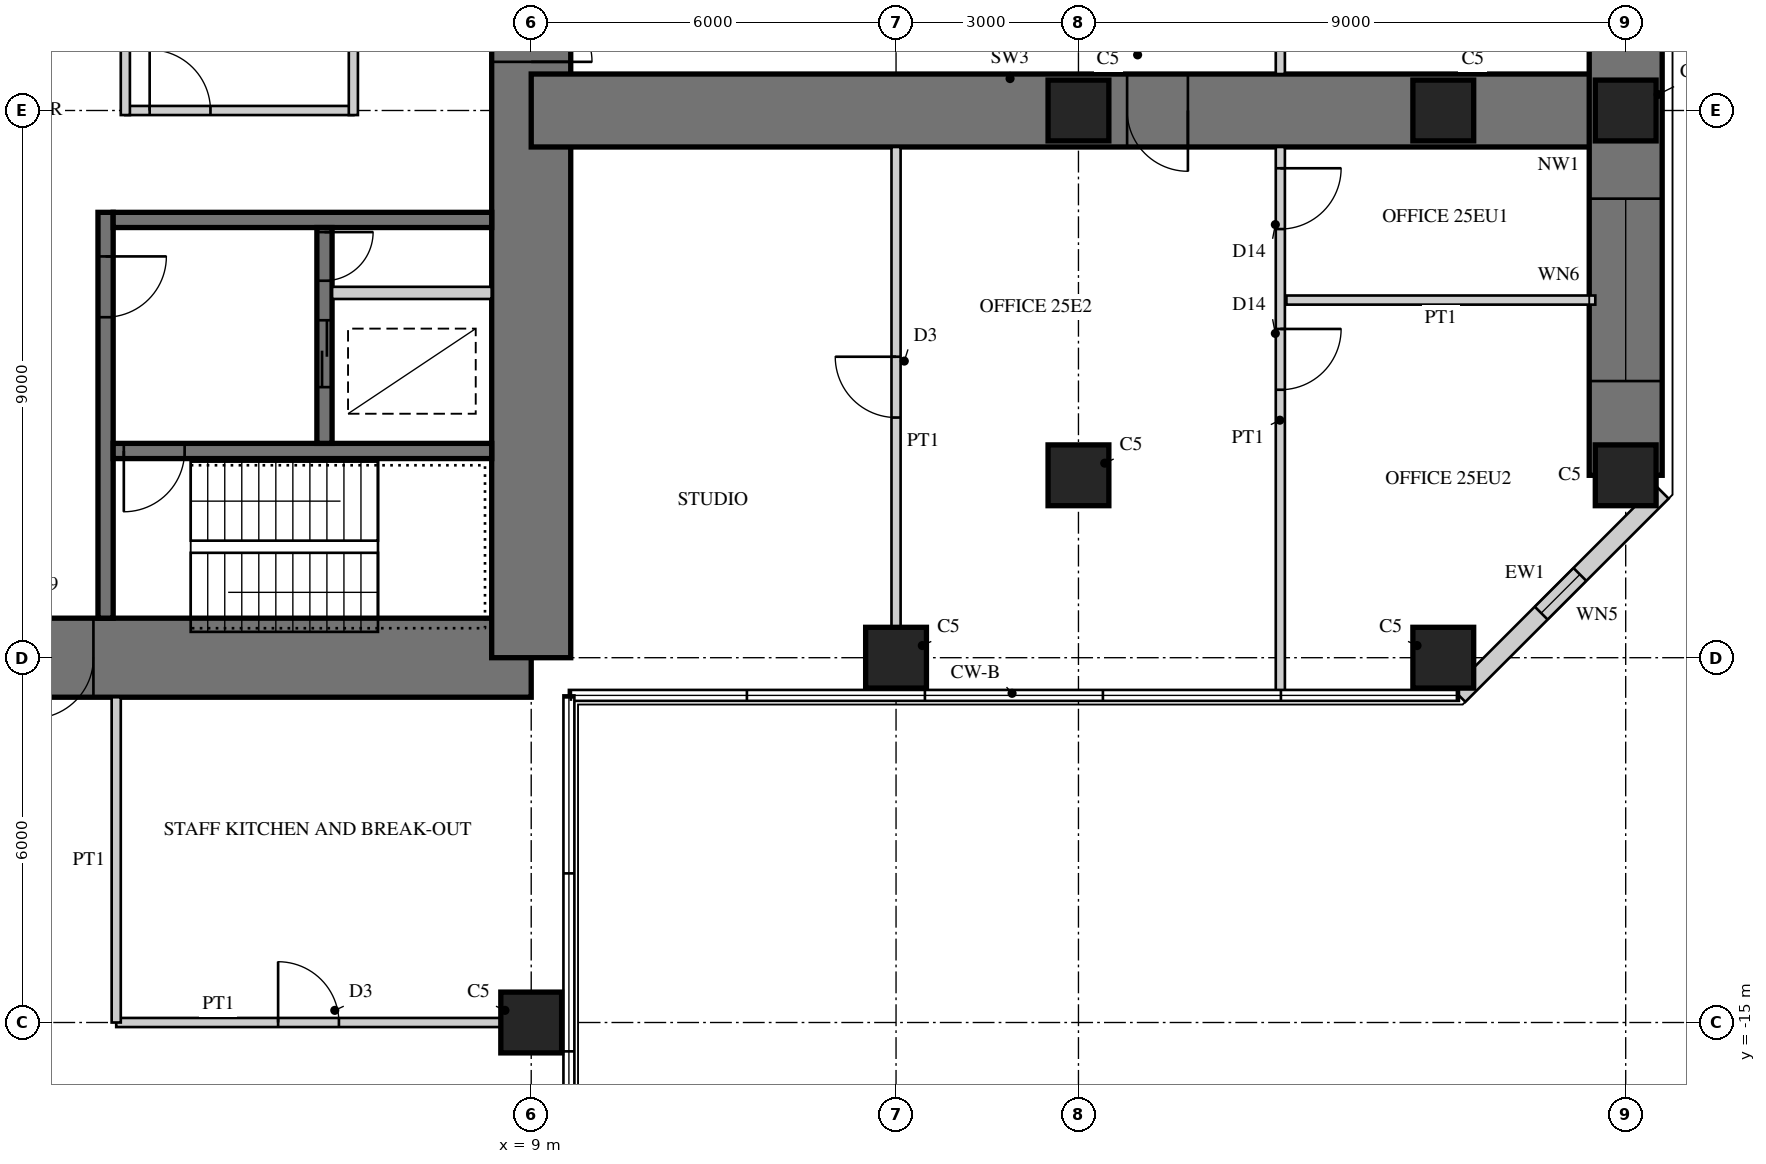
"""IFC4 building model, lengths in metres.
Left out: names, types, materials, properties, quantities, classifications, styles, units other than length and angle.
Written with IfcOpenShell. Run it as: python <this file> out.ifc"""

import sys

from ifc_helpers import new_model, si_unit, direction, frame, frame_2d, origin, origin_2d, place, context, subcontext, project, spatial, rectangle, hollow_rectangle, extrude, element, fill, save


model = new_model("IFC4")
c1 = context("Model", 3, precision=1e-05, world=origin(), true_north=direction((0.0, 1.0)))
c2 = subcontext(c1, "Body", "Model", "MODEL_VIEW")
j1 = project(units=[si_unit("LENGTHUNIT", "METRE"), si_unit("PLANEANGLEUNIT", "RADIAN")], contexts=[c1])
p1 = place(None, origin())
s1 = spatial("IfcSite", under=j1, at=p1, CompositionType="ELEMENT")
p2 = place(p1, origin())
s2 = spatial("IfcBuilding", under=s1, at=p2, CompositionType="ELEMENT")
p3 = place(p2, frame((0.0, 0.0, 104.5)))
s3 = spatial("IfcBuildingStorey", under=s2, at=p3, CompositionType="ELEMENT", Elevation=104.5)
p4 = place(p3, frame((-9.0, -9.0, 0.0), z_axis=(0.0, 0.0, 1.0), x_axis=(1.0, 0.0, 0.0)))
e1 = element("IfcWall", 1, at=p4, inside=s3, PredefinedType="SHEAR", context=c2, shape_type="SweptSolid", body=[
    extrude(rectangle(XDim=18.0, YDim=1.3, at=frame_2d((9.0, 0.0))), origin(), (0.0, 0.0, 1.0), 4.0),
])
p5 = place(p4, frame((9.8, 0.0, 0.0)))
e2 = element("IfcOpeningElement", 2, at=p5, cuts=e1, PredefinedType="OPENING", context=c2, shape_type="SweptSolid", body=[
    extrude(rectangle(XDim=1.0, YDim=2.4, at=frame_2d((0.5, 1.2))), frame((0.0, 0.66, 0.0), z_axis=(0.0, -1.0, 0.0), x_axis=(1.0, 0.0, 0.0)), (0.0, 0.0, 1.0), 1.32),
])
p6 = place(p3, frame((9.0, -9.0, 0.0), z_axis=(0.0, 0.0, 1.0), x_axis=(0.0, 1.0, 0.0)))
e3 = element("IfcWall", 3, at=p6, inside=s3, PredefinedType="SHEAR", context=c2, shape_type="SweptSolid", body=[
    extrude(rectangle(XDim=18.0, YDim=1.3, at=frame_2d((9.0, 0.0))), origin(), (0.0, 0.0, 1.0), 4.0),
])
p7 = place(p6, frame((9.8, 0.0, 0.0)))
e4 = element("IfcOpeningElement", 4, at=p7, cuts=e3, PredefinedType="OPENING", context=c2, shape_type="SweptSolid", body=[
    extrude(rectangle(XDim=1.0, YDim=2.4, at=frame_2d((0.5, 1.2))), frame((0.0, 0.66, 0.0), z_axis=(0.0, -1.0, 0.0), x_axis=(1.0, 0.0, 0.0)), (0.0, 0.0, 1.0), 1.32),
])
p8 = place(p3, frame((2.0, -1.675, 0.0), z_axis=(0.0, 0.0, 1.0), x_axis=(0.0, -1.0, 0.0)))
e5 = element("IfcWall", 5, at=p8, inside=s3, PredefinedType="SHEAR", context=c2, shape_type="SweptSolid", body=[
    extrude(rectangle(XDim=6.675, YDim=0.25, at=frame_2d((3.337, 0.0))), origin(), (0.0, 0.0, 1.0), 4.0),
])
p9 = place(p8, frame((0.725, 0.0, 0.0)))
e6 = element("IfcOpeningElement", 6, at=p9, cuts=e5, PredefinedType="OPENING", context=c2, shape_type="SweptSolid", body=[
    extrude(rectangle(XDim=1.0, YDim=2.1, at=frame_2d((0.5, 1.05))), frame((0.0, 0.135, 0.0), z_axis=(0.0, -1.0, 0.0), x_axis=(1.0, 0.0, 0.0)), (0.0, 0.0, 1.0), 0.27),
])
p10 = place(p3, frame((2.125, -1.8, 0.0), z_axis=(0.0, 0.0, 1.0), x_axis=(1.0, 0.0, 0.0)))
e7 = element("IfcWall", 7, at=p10, inside=s3, PredefinedType="SHEAR", context=c2, shape_type="SweptSolid", body=[
    extrude(rectangle(XDim=6.225, YDim=0.25, at=frame_2d((3.113, 0.0))), origin(), (0.0, 0.0, 1.0), 4.0),
])
p11 = place(p3, frame((2.125, -5.6, 0.0), z_axis=(0.0, 0.0, 1.0), x_axis=(1.0, 0.0, 0.0)))
e8 = element("IfcWall", 8, at=p11, inside=s3, PredefinedType="SHEAR", context=c2, shape_type="SweptSolid", body=[
    extrude(rectangle(XDim=6.225, YDim=0.25, at=frame_2d((3.113, 0.0))), origin(), (0.0, 0.0, 1.0), 4.0),
])
p12 = place(p11, frame((0.175, 0.0, 0.0)))
e9 = element("IfcOpeningElement", 9, at=p12, cuts=e8, PredefinedType="OPENING", context=c2, shape_type="SweptSolid", body=[
    extrude(rectangle(XDim=1.0, YDim=2.1, at=frame_2d((0.5, 1.05))), frame((0.0, 0.135, 0.0), z_axis=(0.0, -1.0, 0.0), x_axis=(1.0, 0.0, 0.0)), (0.0, 0.0, 1.0), 0.27),
])
p13 = place(p3, frame((5.6, -1.925, 0.0), z_axis=(0.0, 0.0, 1.0), x_axis=(0.0, -1.0, 0.0)))
e10 = element("IfcWall", 10, at=p13, inside=s3, PredefinedType="SHEAR", context=c2, shape_type="SweptSolid", body=[
    extrude(rectangle(XDim=3.55, YDim=0.25, at=frame_2d((1.775, 0.0))), origin(), (0.0, 0.0, 1.0), 4.0),
])
p14 = place(p13, frame((1.525, 0.0, 0.0)))
e11 = element("IfcOpeningElement", 11, at=p14, cuts=e10, PredefinedType="OPENING", context=c2, shape_type="SweptSolid", body=[
    extrude(rectangle(XDim=1.1, YDim=2.2, at=frame_2d((0.55, 1.1))), frame((0.0, 0.135, 0.0), z_axis=(0.0, -1.0, 0.0), x_axis=(1.0, 0.0, 0.0)), (0.0, 0.0, 1.0), 0.27),
])
p15 = place(p13, frame((0.075, 0.0, 0.0)))
e12 = element("IfcOpeningElement", 12, at=p15, cuts=e10, PredefinedType="OPENING", context=c2, shape_type="SweptSolid", body=[
    extrude(rectangle(XDim=0.8, YDim=2.1, at=frame_2d((0.4, 1.05))), frame((0.0, 0.135, 0.0), z_axis=(0.0, -1.0, 0.0), x_axis=(1.0, 0.0, 0.0)), (0.0, 0.0, 1.0), 0.27),
])
p16 = place(p3, frame((5.725, -3.0, 0.0), z_axis=(0.0, 0.0, 1.0), x_axis=(1.0, 0.0, 0.0)))
e13 = element("IfcWall", 13, at=p16, inside=s3, PredefinedType="PARTITIONING", context=c2, shape_type="SweptSolid", body=[
    extrude(rectangle(XDim=2.625, YDim=0.2, at=frame_2d((1.312, 0.0))), origin(), (0.0, 0.0, 1.0), 4.0),
])
p17 = place(p3, frame((9.0, 0.0, 0.0), z_axis=(0.0, 0.0, 1.0), x_axis=(1.0, 0.0, 0.0)))
e14 = element("IfcWall", 14, at=p17, inside=s3, PredefinedType="SHEAR", context=c2, shape_type="SweptSolid", body=[
    extrude(rectangle(XDim=18.0, YDim=1.2, at=frame_2d((9.0, 0.0))), origin(), (0.0, 0.0, 1.0), 4.0),
])
p18 = place(p17, frame((9.8, 0.0, 0.0)))
e15 = element("IfcOpeningElement", 15, at=p18, cuts=e14, PredefinedType="OPENING", context=c2, shape_type="SweptSolid", body=[
    extrude(rectangle(XDim=1.0, YDim=2.2, at=frame_2d((0.5, 1.1))), frame((0.0, 0.61, 0.0), z_axis=(0.0, -1.0, 0.0), x_axis=(1.0, 0.0, 0.0)), (0.0, 0.0, 1.0), 1.22),
])
p19 = place(p3, frame((27.0, -6.0, 0.0), z_axis=(0.0, 0.0, 1.0), x_axis=(0.0, 1.0, 0.0)))
e16 = element("IfcWall", 16, at=p19, inside=s3, PredefinedType="SHEAR", context=c2, shape_type="SweptSolid", body=[
    extrude(rectangle(XDim=12.0, YDim=1.2, at=frame_2d((6.0, 0.0))), origin(), (0.0, 0.0, 1.0), 4.0),
])
p20 = place(p19, frame((1.55, 0.0, 0.6)))
e17 = element("IfcOpeningElement", 17, at=p20, cuts=e16, PredefinedType="OPENING", context=c2, shape_type="SweptSolid", body=[
    extrude(rectangle(XDim=3.0, YDim=2.4, at=frame_2d((1.5, 1.2))), frame((0.0, 0.61, 0.0), z_axis=(0.0, -1.0, 0.0), x_axis=(1.0, 0.0, 0.0)), (0.0, 0.0, 1.0), 1.22),
])
p21 = place(p19, frame((7.45, 0.0, 0.6)))
e18 = element("IfcOpeningElement", 18, at=p21, cuts=e16, PredefinedType="OPENING", context=c2, shape_type="SweptSolid", body=[
    extrude(rectangle(XDim=3.0, YDim=2.4, at=frame_2d((1.5, 1.2))), frame((0.0, 0.61, 0.0), z_axis=(0.0, -1.0, 0.0), x_axis=(1.0, 0.0, 0.0)), (0.0, 0.0, 1.0), 1.22),
])
for number, where, z_axis, x_axis in (
    (19, (15.0, -9.0, 0.0), (0.0, 0.0, 1.0), (1.0, 0.0, 0.0)),
    (20, (24.0, -9.0, 0.0), (0.0, 0.0, 1.0), (1.0, 0.0, 0.0)),
    (21, (27.0, -6.0, 0.0), (0.0, 0.0, 1.0), (1.0, 0.0, 0.0)),
    (22, (27.0, 0.0, 0.0), (0.0, 0.0, 1.0), (1.0, 0.0, 0.0)),
    (23, (9.0, -15.0, 0.0), (0.0, 0.0, 1.0), (1.0, 0.0, 0.0)),
    (24, (18.0, -6.0, 0.0), (0.0, 0.0, 1.0), (1.0, 0.0, 0.0)),
    (25, (18.0, 0.0, 0.0), (0.0, 0.0, 1.0), (1.0, 0.0, 0.0)),
    (26, (24.0, 0.0, 0.0), (0.0, 0.0, 1.0), (1.0, 0.0, 0.0)),
):
    element("IfcColumn", number, at=place(p3, frame(where, z_axis=z_axis, x_axis=x_axis)), inside=s3, PredefinedType="COLUMN", context=c2, shape_type="SweptSolid", body=[
        extrude(rectangle(XDim=1.0, YDim=1.0, at=origin_2d()), origin(), (0.0, 0.0, 1.0), 4.0),
    ])
p22 = place(p3, frame((24.257, -9.62, 0.0), z_axis=(0.0, 0.0, 1.0), x_axis=(0.707106781187, 0.707106781187, 0.0)))
e27 = element("IfcWall", 27, at=p22, inside=s3, PredefinedType="SOLIDWALL", context=c2, shape_type="SweptSolid", body=[
    extrude(rectangle(XDim=4.728, YDim=0.3, at=frame_2d((2.364, 0.0))), origin(), (0.0, 0.0, 1.0), 3.8),
])
p23 = place(p22, frame((1.914, 0.0, 0.3)))
e28 = element("IfcOpeningElement", 28, at=p23, cuts=e27, PredefinedType="OPENING", context=c2, shape_type="SweptSolid", body=[
    extrude(rectangle(XDim=0.9, YDim=2.4, at=frame_2d((0.45, 1.2))), frame((0.0, 0.16, 0.0), z_axis=(0.0, -1.0, 0.0), x_axis=(1.0, 0.0, 0.0)), (0.0, 0.0, 1.0), 0.32),
])
p24 = place(p3, frame((2.325, 0.0, 0.0), z_axis=(0.0, 0.0, 1.0), x_axis=(1.0, 0.0, 0.0)))
e29 = element("IfcWall", 29, at=p24, inside=s3, PredefinedType="PARTITIONING", context=c2, shape_type="SweptSolid", body=[
    extrude(rectangle(XDim=3.75, YDim=0.15, at=frame_2d((1.875, 0.0))), origin(), (0.0, 0.0, 1.0), 3.8),
])
p25 = place(p24, frame((0.4, 0.0, 0.0)))
e30 = element("IfcOpeningElement", 30, at=p25, cuts=e29, PredefinedType="OPENING", context=c2, shape_type="SweptSolid", body=[
    extrude(rectangle(XDim=1.0, YDim=2.1, at=frame_2d((0.5, 1.05))), frame((0.0, 0.085, 0.0), z_axis=(0.0, -1.0, 0.0), x_axis=(1.0, 0.0, 0.0)), (0.0, 0.0, 1.0), 0.17),
])
for number, where, z_axis, x_axis in (
    (31, (2.325, 1.875, 0.0), (0.0, 0.0, 1.0), (0.0, -1.0, 0.0)),
    (32, (6.075, -0.075, 0.0), (0.0, 0.0, 1.0), (0.0, 1.0, 0.0)),
):
    element("IfcWall", number, at=place(p3, frame(where, z_axis=z_axis, x_axis=x_axis)), inside=s3, PredefinedType="PARTITIONING", context=c2, shape_type="SweptSolid", body=[
        extrude(rectangle(XDim=1.95, YDim=0.15, at=frame_2d((0.975, 0.0))), origin(), (0.0, 0.0, 1.0), 3.8),
    ])
p26 = place(p3, frame((15.0, -8.5, 0.0), z_axis=(0.0, 0.0, 1.0), x_axis=(0.0, 1.0, 0.0)))
e33 = element("IfcWall", 33, at=p26, inside=s3, PredefinedType="PARTITIONING", context=c2, shape_type="SweptSolid", body=[
    extrude(rectangle(XDim=7.9, YDim=0.15, at=frame_2d((3.95, 0.0))), origin(), (0.0, 0.0, 1.0), 3.0),
])
p27 = place(p26, frame((3.45, 0.0, 0.0)))
e34 = element("IfcOpeningElement", 34, at=p27, cuts=e33, PredefinedType="OPENING", context=c2, shape_type="SweptSolid", body=[
    extrude(rectangle(XDim=1.0, YDim=2.1, at=frame_2d((0.5, 1.05))), frame((0.0, 0.085, 0.0), z_axis=(0.0, -1.0, 0.0), x_axis=(1.0, 0.0, 0.0)), (0.0, 0.0, 1.0), 0.17),
])
p28 = place(p3, frame((21.32, 0.6, 0.0), z_axis=(0.0, 0.0, 1.0), x_axis=(0.0, 1.0, 0.0)))
e35 = element("IfcWall", 35, at=p28, inside=s3, PredefinedType="PARTITIONING", context=c2, shape_type="SweptSolid", body=[
    extrude(rectangle(XDim=8.98, YDim=0.15, at=frame_2d((4.49, 0.0))), origin(), (0.0, 0.0, 1.0), 3.8),
])
p29 = place(p28, frame((0.45, 0.0, 0.0)))
e36 = element("IfcOpeningElement", 36, at=p29, cuts=e35, PredefinedType="OPENING", context=c2, shape_type="SweptSolid", body=[
    extrude(rectangle(XDim=1.0, YDim=2.2, at=frame_2d((0.5, 1.1))), frame((0.0, 0.085, 0.0), z_axis=(0.0, -1.0, 0.0), x_axis=(1.0, 0.0, 0.0)), (0.0, 0.0, 1.0), 0.17),
])
p30 = place(p3, frame((21.42, -3.118, 0.0), z_axis=(0.0, 0.0, 1.0), x_axis=(1.0, 0.0, 0.0)))
e37 = element("IfcWall", 37, at=p30, inside=s3, PredefinedType="PARTITIONING", context=c2, shape_type="SweptSolid", body=[
    extrude(rectangle(XDim=5.08, YDim=0.15, at=frame_2d((2.54, 0.0))), origin(), (0.0, 0.0, 1.0), 3.8),
])
p31 = place(p3, frame((21.32, -9.58, 0.0), z_axis=(0.0, 0.0, 1.0), x_axis=(0.0, 1.0, 0.0)))
e38 = element("IfcWall", 38, at=p31, inside=s3, PredefinedType="PARTITIONING", context=c2, shape_type="SweptSolid", body=[
    extrude(rectangle(XDim=8.98, YDim=0.15, at=frame_2d((4.49, 0.0))), origin(), (0.0, 0.0, 1.0), 3.8),
])
p32 = place(p31, frame((4.987, 0.0, 0.0)))
e39 = element("IfcOpeningElement", 39, at=p32, cuts=e38, PredefinedType="OPENING", context=c2, shape_type="SweptSolid", body=[
    extrude(rectangle(XDim=1.0, YDim=2.2, at=frame_2d((0.5, 1.1))), frame((0.0, 0.085, 0.0), z_axis=(0.0, -1.0, 0.0), x_axis=(1.0, 0.0, 0.0)), (0.0, 0.0, 1.0), 0.17),
])
p33 = place(p31, frame((7.63, 0.0, 0.0)))
e40 = element("IfcOpeningElement", 40, at=p33, cuts=e38, PredefinedType="OPENING", context=c2, shape_type="SweptSolid", body=[
    extrude(rectangle(XDim=1.0, YDim=2.2, at=frame_2d((0.5, 1.1))), frame((0.0, 0.085, 0.0), z_axis=(0.0, -1.0, 0.0), x_axis=(1.0, 0.0, 0.0)), (0.0, 0.0, 1.0), 0.17),
])
p34 = place(p3, frame((2.175, -15.0, 0.0), z_axis=(0.0, 0.0, 1.0), x_axis=(1.0, 0.0, 0.0)))
e41 = element("IfcWall", 41, at=p34, inside=s3, PredefinedType="PARTITIONING", context=c2, shape_type="SweptSolid", body=[
    extrude(rectangle(XDim=6.325, YDim=0.15, at=frame_2d((3.163, 0.0))), origin(), (0.0, 0.0, 1.0), 3.0),
])
p35 = place(p34, frame((2.663, 0.0, 0.0)))
e42 = element("IfcOpeningElement", 42, at=p35, cuts=e41, PredefinedType="OPENING", context=c2, shape_type="SweptSolid", body=[
    extrude(rectangle(XDim=1.0, YDim=2.1, at=frame_2d((0.5, 1.05))), frame((0.0, 0.085, 0.0), z_axis=(0.0, -1.0, 0.0), x_axis=(1.0, 0.0, 0.0)), (0.0, 0.0, 1.0), 0.17),
])
p36 = place(p3, frame((2.175, -9.65, 0.0), z_axis=(0.0, 0.0, 1.0), x_axis=(0.0, -1.0, 0.0)))
e43 = element("IfcWall", 43, at=p36, inside=s3, PredefinedType="PARTITIONING", context=c2, shape_type="SweptSolid", body=[
    extrude(rectangle(XDim=5.35, YDim=0.15, at=frame_2d((2.675, 0.0))), origin(), (0.0, 0.0, 1.0), 3.8),
])
p37 = place(p23, origin())
e44 = element("IfcWindow", 44, at=p37, inside=s3, PartitioningType="SINGLE_PANEL", PredefinedType="WINDOW", context=c2, shape_type="SweptSolid", body=[
    extrude(hollow_rectangle(XDim=0.9, YDim=2.4, WallThickness=0.06, at=frame_2d((0.45, 1.2))), frame((0.0, 0.03, 0.0), z_axis=(0.0, -1.0, 0.0), x_axis=(1.0, 0.0, 0.0)), (0.0, 0.0, 1.0), 0.06),
    extrude(rectangle(XDim=0.779, YDim=2.279, at=frame_2d((0.45, 1.2))), frame((0.0, 0.03, 0.0), z_axis=(0.0, -1.0, 0.0), x_axis=(1.0, 0.0, 0.0)), (0.0, 0.0, 1.0), 0.06),
])
fill(e28, e44)
p38 = place(p20, origin())
e45 = element("IfcWindow", 45, at=p38, inside=s3, PartitioningType="SINGLE_PANEL", PredefinedType="WINDOW", context=c2, shape_type="SweptSolid", body=[
    extrude(hollow_rectangle(XDim=3.0, YDim=2.4, WallThickness=0.06, at=frame_2d((1.5, 1.2))), frame((0.0, 0.03, 0.0), z_axis=(0.0, -1.0, 0.0), x_axis=(1.0, 0.0, 0.0)), (0.0, 0.0, 1.0), 0.06),
    extrude(rectangle(XDim=2.879, YDim=2.279, at=frame_2d((1.5, 1.2))), frame((0.0, 0.03, 0.0), z_axis=(0.0, -1.0, 0.0), x_axis=(1.0, 0.0, 0.0)), (0.0, 0.0, 1.0), 0.06),
])
fill(e17, e45)
p39 = place(p25, origin())
e46 = element("IfcDoor", 46, at=p39, inside=s3, OperationType="SINGLE_SWING_LEFT", PredefinedType="DOOR", context=c2, shape_type="SweptSolid", body=[
    extrude(rectangle(XDim=1.0, YDim=2.1, at=frame_2d((0.5, 1.05))), frame((0.0, 0.025, 0.0), z_axis=(0.0, -1.0, 0.0), x_axis=(1.0, 0.0, 0.0)), (0.0, 0.0, 1.0), 0.05),
])
fill(e30, e46)
p40 = place(p27, origin())
e47 = element("IfcDoor", 47, at=p40, inside=s3, OperationType="SINGLE_SWING_RIGHT", PredefinedType="DOOR", context=c2, shape_type="SweptSolid", body=[
    extrude(rectangle(XDim=1.0, YDim=2.1, at=frame_2d((0.5, 1.05))), frame((0.0, 0.025, 0.0), z_axis=(0.0, -1.0, 0.0), x_axis=(1.0, 0.0, 0.0)), (0.0, 0.0, 1.0), 0.05),
])
fill(e34, e47)
p41 = place(p32, frame((1.0, 0.0, 0.0), z_axis=(0.0, 0.0, 1.0), x_axis=(-1.0, 0.0, 0.0)))
e48 = element("IfcDoor", 48, at=p41, inside=s3, OperationType="SINGLE_SWING_LEFT", PredefinedType="DOOR", context=c2, shape_type="SweptSolid", body=[
    extrude(rectangle(XDim=1.0, YDim=2.2, at=frame_2d((0.5, 1.1))), frame((0.0, 0.025, 0.0), z_axis=(0.0, -1.0, 0.0), x_axis=(1.0, 0.0, 0.0)), (0.0, 0.0, 1.0), 0.05),
])
fill(e39, e48)
p42 = place(p33, frame((1.0, 0.0, 0.0), z_axis=(0.0, 0.0, 1.0), x_axis=(-1.0, 0.0, 0.0)))
e49 = element("IfcDoor", 49, at=p42, inside=s3, OperationType="SINGLE_SWING_LEFT", PredefinedType="DOOR", context=c2, shape_type="SweptSolid", body=[
    extrude(rectangle(XDim=1.0, YDim=2.2, at=frame_2d((0.5, 1.1))), frame((0.0, 0.025, 0.0), z_axis=(0.0, -1.0, 0.0), x_axis=(1.0, 0.0, 0.0)), (0.0, 0.0, 1.0), 0.05),
])
fill(e40, e49)
p43 = place(p35, origin())
e50 = element("IfcDoor", 50, at=p43, inside=s3, OperationType="SINGLE_SWING_LEFT", PredefinedType="DOOR", context=c2, shape_type="SweptSolid", body=[
    extrude(rectangle(XDim=1.0, YDim=2.1, at=frame_2d((0.5, 1.05))), frame((0.0, 0.025, 0.0), z_axis=(0.0, -1.0, 0.0), x_axis=(1.0, 0.0, 0.0)), (0.0, 0.0, 1.0), 0.05),
])
fill(e42, e50)
p44 = place(p18, frame((1.0, 0.0, 0.0), z_axis=(0.0, 0.0, 1.0), x_axis=(-1.0, 0.0, 0.0)))
e51 = element("IfcDoor", 51, at=p44, inside=s3, OperationType="SINGLE_SWING_LEFT", PredefinedType="DOOR", context=c2, shape_type="SweptSolid", body=[
    extrude(rectangle(XDim=1.0, YDim=2.2, at=frame_2d((0.5, 1.1))), frame((0.0, 0.025, 0.0), z_axis=(0.0, -1.0, 0.0), x_axis=(1.0, 0.0, 0.0)), (0.0, 0.0, 1.0), 0.05),
])
fill(e15, e51)
p45 = place(p5, frame((1.0, 0.0, 0.0), z_axis=(0.0, 0.0, 1.0), x_axis=(-1.0, 0.0, 0.0)))
e52 = element("IfcDoor", 52, at=p45, inside=s3, OperationType="SINGLE_SWING_RIGHT", PredefinedType="DOOR", context=c2, shape_type="SweptSolid", body=[
    extrude(rectangle(XDim=1.0, YDim=2.4, at=frame_2d((0.5, 1.2))), frame((0.0, -0.005, 0.0), z_axis=(0.0, -1.0, 0.0), x_axis=(1.0, 0.0, 0.0)), (0.0, 0.0, 1.0), 0.05),
])
fill(e2, e52)
p46 = place(p7, frame((1.0, 0.0, 0.0), z_axis=(0.0, 0.0, 1.0), x_axis=(-1.0, 0.0, 0.0)))
e53 = element("IfcDoor", 53, at=p46, inside=s3, OperationType="SINGLE_SWING_RIGHT", PredefinedType="DOOR", context=c2, shape_type="SweptSolid", body=[
    extrude(rectangle(XDim=1.0, YDim=2.4, at=frame_2d((0.5, 1.2))), frame((0.0, -0.005, 0.0), z_axis=(0.0, -1.0, 0.0), x_axis=(1.0, 0.0, 0.0)), (0.0, 0.0, 1.0), 0.05),
])
fill(e4, e53)
p47 = place(p9, origin())
e54 = element("IfcDoor", 54, at=p47, inside=s3, OperationType="SINGLE_SWING_LEFT", PredefinedType="DOOR", context=c2, shape_type="SweptSolid", body=[
    extrude(rectangle(XDim=1.0, YDim=2.1, at=frame_2d((0.5, 1.05))), frame((0.0, 0.025, 0.0), z_axis=(0.0, -1.0, 0.0), x_axis=(1.0, 0.0, 0.0)), (0.0, 0.0, 1.0), 0.05),
])
fill(e6, e54)
p48 = place(p12, frame((1.0, 0.0, 0.0), z_axis=(0.0, 0.0, 1.0), x_axis=(-1.0, 0.0, 0.0)))
e55 = element("IfcDoor", 55, at=p48, inside=s3, OperationType="SINGLE_SWING_RIGHT", PredefinedType="DOOR", context=c2, shape_type="SweptSolid", body=[
    extrude(rectangle(XDim=1.0, YDim=2.1, at=frame_2d((0.5, 1.05))), frame((0.0, 0.025, 0.0), z_axis=(0.0, -1.0, 0.0), x_axis=(1.0, 0.0, 0.0)), (0.0, 0.0, 1.0), 0.05),
])
fill(e9, e55)
p49 = place(p14, origin())
e56 = element("IfcDoor", 56, at=p49, inside=s3, OperationType="DOUBLE_DOOR_SLIDING", PredefinedType="DOOR", context=c2, shape_type="SweptSolid", body=[
    extrude(rectangle(XDim=1.1, YDim=2.2, at=frame_2d((0.55, 1.1))), frame((0.0, 0.025, 0.0), z_axis=(0.0, -1.0, 0.0), x_axis=(1.0, 0.0, 0.0)), (0.0, 0.0, 1.0), 0.05),
])
fill(e11, e56)
p50 = place(p15, origin())
e57 = element("IfcDoor", 57, at=p50, inside=s3, OperationType="SINGLE_SWING_LEFT", PredefinedType="DOOR", context=c2, shape_type="SweptSolid", body=[
    extrude(rectangle(XDim=0.8, YDim=2.1, at=frame_2d((0.4, 1.05))), frame((0.0, 0.025, 0.0), z_axis=(0.0, -1.0, 0.0), x_axis=(1.0, 0.0, 0.0)), (0.0, 0.0, 1.0), 0.05),
])
fill(e12, e57)
save(model, sys.argv[1])
